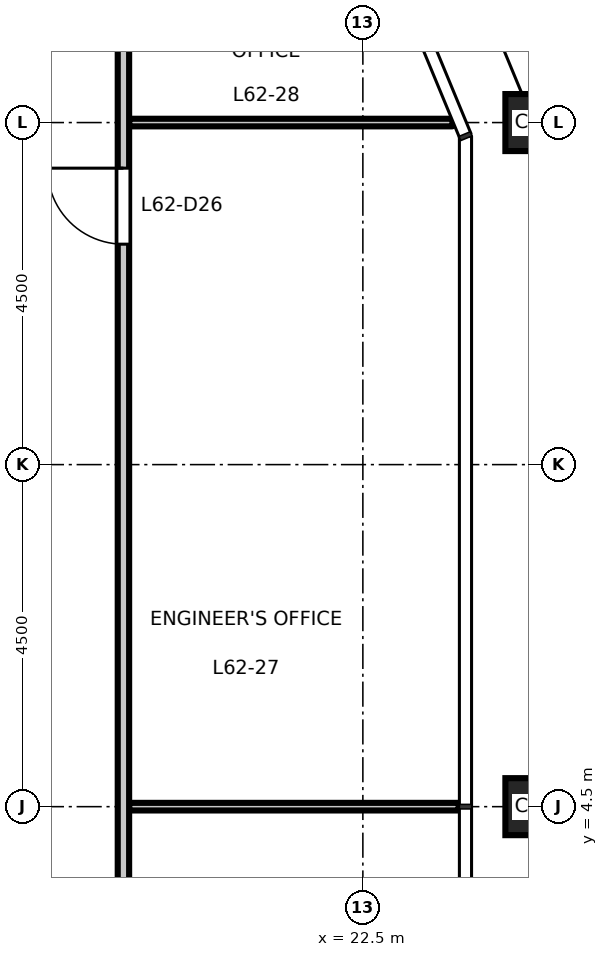
"""IFC4 building model, lengths in metres.
Left out: names, types, materials, properties, quantities, classifications, styles, units other than length and angle.
Written with IfcOpenShell. Run it as: python <this file> out.ifc"""

import sys

from ifc_helpers import new_model, si_unit, direction, frame, frame_2d, origin, origin_2d, place, context, subcontext, project, spatial, rectangle, hollow_rectangle, extrude, element, fill, save


model = new_model("IFC4")
c1 = context("Model", 3, precision=1e-05, world=origin(), true_north=direction((0.0, 1.0)))
c2 = subcontext(c1, "Body", "Model", "MODEL_VIEW")
j1 = project(units=[si_unit("LENGTHUNIT", "METRE"), si_unit("PLANEANGLEUNIT", "RADIAN")], contexts=[c1])
p1 = place(None, origin())
s1 = spatial("IfcSite", under=j1, at=p1, CompositionType="ELEMENT")
p2 = place(p1, origin())
s2 = spatial("IfcBuilding", under=s1, at=p2, CompositionType="ELEMENT")
p3 = place(p2, frame((0.0, 0.0, 289.7)))
s3 = spatial("IfcBuildingStorey", under=s2, at=p3, CompositionType="ELEMENT", Elevation=289.7)
for number, where, z_axis, x_axis in (
    (1, (24.75, 4.5, 0.0), (0.0, 0.0, 1.0), (1.0, 0.0, 0.0)),
    (2, (24.75, 13.5, 0.0), (0.0, 0.0, 1.0), (1.0, 0.0, 0.0)),
):
    element("IfcColumn", number, at=place(p3, frame(where, z_axis=z_axis, x_axis=x_axis)), inside=s3, PredefinedType="COLUMN", context=c2, shape_type="SweptSolid", body=[
        extrude(hollow_rectangle(XDim=0.75, YDim=0.75, WallThickness=0.04, at=origin_2d()), origin(), (0.0, 0.0, 1.0), 4.5),
    ])
p4 = place(p3, frame((19.425, 4.5, 0.0), z_axis=(0.0, 0.0, 1.0), x_axis=(1.0, 0.0, 0.0)))
e3 = element("IfcWall", 3, at=p4, inside=s3, PredefinedType="PARTITIONING", context=c2, shape_type="SweptSolid", body=[
    extrude(rectangle(XDim=4.335, YDim=0.1, at=frame_2d((2.167, 0.0))), origin(), (0.0, 0.0, 1.0), 4.35),
])
p5 = place(p3, frame((19.425, 13.5, 0.0), z_axis=(0.0, 0.0, 1.0), x_axis=(1.0, 0.0, 0.0)))
e4 = element("IfcWall", 4, at=p5, inside=s3, PredefinedType="PARTITIONING", context=c2, shape_type="SweptSolid", body=[
    extrude(rectangle(XDim=4.253, YDim=0.1, at=frame_2d((2.126, 0.0))), origin(), (0.0, 0.0, 1.0), 4.35),
])
p6 = place(p3, frame((19.35, -16.425, 0.0), z_axis=(0.0, 0.0, 1.0), x_axis=(0.0, 1.0, 0.0)))
e5 = element("IfcWall", 5, at=p6, inside=s3, PredefinedType="PARTITIONING", context=c2, shape_type="SweptSolid", body=[
    extrude(rectangle(XDim=32.85, YDim=0.15, at=frame_2d((16.425, 0.0))), origin(), (0.0, 0.0, 1.0), 4.35),
])
p7 = place(p6, frame((10.325, 0.0, 0.0)))
e6 = element("IfcOpeningElement", 6, at=p7, cuts=e5, PredefinedType="OPENING", context=c2, shape_type="SweptSolid", body=[
    extrude(rectangle(XDim=1.0, YDim=2.1, at=frame_2d((0.5, 1.05))), frame((0.0, 0.085, 0.0), z_axis=(0.0, -1.0, 0.0), x_axis=(1.0, 0.0, 0.0)), (0.0, 0.0, 1.0), 0.17),
])
p8 = place(p6, frame((12.575, 0.0, 0.0)))
e7 = element("IfcOpeningElement", 7, at=p8, cuts=e5, PredefinedType="OPENING", context=c2, shape_type="SweptSolid", body=[
    extrude(rectangle(XDim=1.0, YDim=2.1, at=frame_2d((0.5, 1.05))), frame((0.0, 0.085, 0.0), z_axis=(0.0, -1.0, 0.0), x_axis=(1.0, 0.0, 0.0)), (0.0, 0.0, 1.0), 0.17),
])
p9 = place(p6, frame((28.325, 0.0, 0.0)))
e8 = element("IfcOpeningElement", 8, at=p9, cuts=e5, PredefinedType="OPENING", context=c2, shape_type="SweptSolid", body=[
    extrude(rectangle(XDim=1.0, YDim=2.1, at=frame_2d((0.5, 1.05))), frame((0.0, 0.085, 0.0), z_axis=(0.0, -1.0, 0.0), x_axis=(1.0, 0.0, 0.0)), (0.0, 0.0, 1.0), 0.17),
])
p10 = place(p9, origin())
e9 = element("IfcDoor", 9, at=p10, inside=s3, OperationType="SINGLE_SWING_RIGHT", PredefinedType="DOOR", context=c2, shape_type="SweptSolid", body=[
    extrude(rectangle(XDim=1.0, YDim=2.1, at=frame_2d((0.5, 1.05))), frame((0.0, 0.025, 0.0), z_axis=(0.0, -1.0, 0.0), x_axis=(1.0, 0.0, 0.0)), (0.0, 0.0, 1.0), 0.05),
])
fill(e8, e9)
save(model, sys.argv[1])
